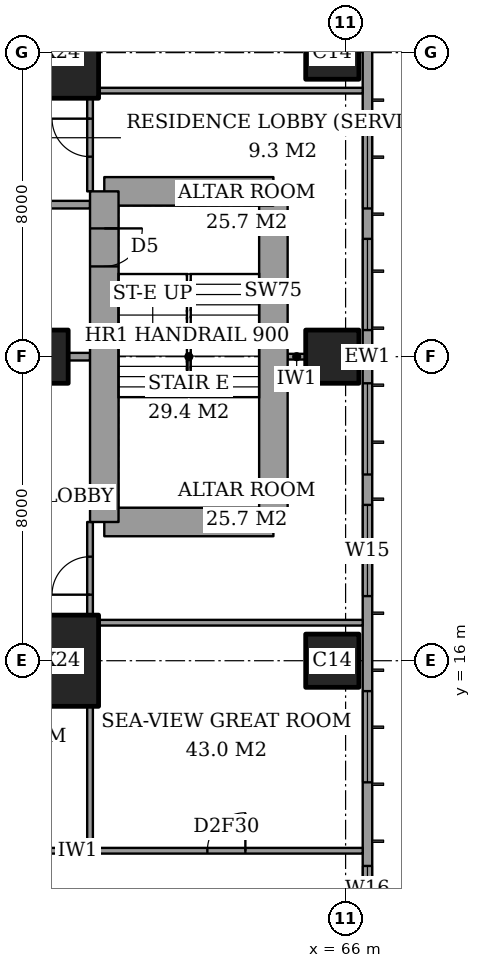
"""IFC4 building model, lengths in metres.
Left out: names, types, materials, properties, quantities, classifications, styles, units other than length and angle.
Written with IfcOpenShell. Run it as: python <this file> out.ifc"""

import sys

from ifc_helpers import new_model, si_unit, direction, frame, frame_2d, origin, origin_2d, place, context, subcontext, project, spatial, rectangle, extrude, element, fill, save


model = new_model("IFC4")
c1 = context("Model", 3, precision=1e-05, world=origin(), true_north=direction((0.0, 1.0)))
c2 = subcontext(c1, "Body", "Model", "MODEL_VIEW")
j1 = project(units=[si_unit("LENGTHUNIT", "METRE"), si_unit("PLANEANGLEUNIT", "RADIAN")], contexts=[c1])
p1 = place(None, origin())
s1 = spatial("IfcSite", under=j1, at=p1, CompositionType="ELEMENT")
p2 = place(p1, origin())
s2 = spatial("IfcBuilding", under=s1, at=p2, CompositionType="ELEMENT")
p3 = place(p2, frame((0.0, 0.0, 282.6)))
s3 = spatial("IfcBuildingStorey", under=s2, at=p3, CompositionType="ELEMENT", Elevation=282.6)
p4 = place(p3, frame((58.0, 16.0, 0.0), z_axis=(0.0, 0.0, 1.0), x_axis=(1.0, 0.0, 0.0)))
e1 = element("IfcColumn", 1, at=p4, inside=s3, PredefinedType="COLUMN", context=c2, shape_type="SweptSolid", body=[
    extrude(rectangle(XDim=3.0, YDim=2.4, at=origin_2d()), origin(), (0.0, 0.0, 1.0), 4.5),
])
p5 = place(p3, frame((58.0, 24.0, 0.0), z_axis=(0.0, 0.0, 1.0), x_axis=(1.0, 0.0, 0.0)))
e2 = element("IfcColumn", 2, at=p5, inside=s3, PredefinedType="COLUMN", context=c2, shape_type="SweptSolid", body=[
    extrude(rectangle(XDim=1.4, YDim=1.4, at=origin_2d()), origin(), (0.0, 0.0, 1.0), 4.5),
])
p6 = place(p3, frame((58.0, 32.0, 0.0), z_axis=(0.0, 0.0, 1.0), x_axis=(1.0, 0.0, 0.0)))
e3 = element("IfcColumn", 3, at=p6, inside=s3, PredefinedType="COLUMN", context=c2, shape_type="SweptSolid", body=[
    extrude(rectangle(XDim=3.0, YDim=2.4, at=origin_2d()), origin(), (0.0, 0.0, 1.0), 4.5),
])
for number, where, z_axis, x_axis in (
    (4, (65.65, 16.0, 0.0), (0.0, 0.0, 1.0), (1.0, 0.0, 0.0)),
    (5, (65.65, 24.0, 0.0), (0.0, 0.0, 1.0), (1.0, 0.0, 0.0)),
    (6, (65.65, 32.0, 0.0), (0.0, 0.0, 1.0), (1.0, 0.0, 0.0)),
):
    element("IfcColumn", number, at=place(p3, frame(where, z_axis=z_axis, x_axis=x_axis)), inside=s3, PredefinedType="COLUMN", context=c2, shape_type="SweptSolid", body=[
        extrude(rectangle(XDim=1.4, YDim=1.4, at=origin_2d()), origin(), (0.0, 0.0, 1.0), 4.5),
    ])
p7 = place(p3, frame((59.65, 19.65, 0.0), z_axis=(0.0, 0.0, 1.0), x_axis=(1.0, 0.0, 0.0)))
e7 = element("IfcWall", 7, at=p7, inside=s3, PredefinedType="SHEAR", context=c2, shape_type="SweptSolid", body=[
    extrude(rectangle(XDim=4.45, YDim=0.75, at=frame_2d((2.225, 0.0))), origin(), (0.0, 0.0, 1.0), 4.5),
])
p8 = place(p3, frame((64.1, 19.65, 0.0), z_axis=(0.0, 0.0, 1.0), x_axis=(0.0, 1.0, 0.0)))
e8 = element("IfcWall", 8, at=p8, inside=s3, PredefinedType="SHEAR", context=c2, shape_type="SweptSolid", body=[
    extrude(rectangle(XDim=8.7, YDim=0.75, at=frame_2d((4.35, 0.0))), origin(), (0.0, 0.0, 1.0), 4.5),
])
p9 = place(p3, frame((64.1, 28.35, 0.0), z_axis=(0.0, 0.0, 1.0), x_axis=(-1.0, 0.0, 0.0)))
e9 = element("IfcWall", 9, at=p9, inside=s3, PredefinedType="SHEAR", context=c2, shape_type="SweptSolid", body=[
    extrude(rectangle(XDim=4.45, YDim=0.75, at=frame_2d((2.225, 0.0))), origin(), (0.0, 0.0, 1.0), 4.5),
])
p10 = place(p3, frame((59.65, 28.35, 0.0), z_axis=(0.0, 0.0, 1.0), x_axis=(0.0, -1.0, 0.0)))
e10 = element("IfcWall", 10, at=p10, inside=s3, PredefinedType="SHEAR", context=c2, shape_type="SweptSolid", body=[
    extrude(rectangle(XDim=8.7, YDim=0.75, at=frame_2d((4.35, 0.0))), origin(), (0.0, 0.0, 1.0), 4.5),
])
p11 = place(p10, frame((0.975, 0.0, 0.0)))
e11 = element("IfcOpeningElement", 11, at=p11, cuts=e10, PredefinedType="OPENING", context=c2, shape_type="SweptSolid", body=[
    extrude(rectangle(XDim=1.0, YDim=2.1, at=frame_2d((0.5, 1.05))), frame((0.0, 0.385, 0.0), z_axis=(0.0, -1.0, 0.0), x_axis=(1.0, 0.0, 0.0)), (0.0, 0.0, 1.0), 0.77),
])
p12 = place(p3, frame((66.575, 3.175, 0.0), z_axis=(0.0, 0.0, 1.0), x_axis=(0.0, 1.0, 0.0)))
e12 = element("IfcWall", 12, at=p12, inside=s3, PredefinedType="SOLIDWALL", context=c2, shape_type="SweptSolid", body=[
    extrude(rectangle(XDim=41.65, YDim=0.25, at=frame_2d((20.825, 0.0))), origin(), (0.0, 0.0, 1.0), 4.5),
])
p13 = place(p12, frame((1.775, 0.0, 0.6)))
e13 = element("IfcOpeningElement", 13, at=p13, cuts=e12, PredefinedType="OPENING", context=c2, shape_type="SweptSolid", body=[
    extrude(rectangle(XDim=2.4, YDim=2.8, at=frame_2d((1.2, 1.4))), frame((0.0, 0.135, 0.0), z_axis=(0.0, -1.0, 0.0), x_axis=(1.0, 0.0, 0.0)), (0.0, 0.0, 1.0), 0.27),
])
p14 = place(p12, frame((6.225, 0.0, 0.6)))
e14 = element("IfcOpeningElement", 14, at=p14, cuts=e12, PredefinedType="OPENING", context=c2, shape_type="SweptSolid", body=[
    extrude(rectangle(XDim=1.2, YDim=2.8, at=frame_2d((0.6, 1.4))), frame((0.0, 0.135, 0.0), z_axis=(0.0, -1.0, 0.0), x_axis=(1.0, 0.0, 0.0)), (0.0, 0.0, 1.0), 0.27),
])
p15 = place(p12, frame((9.625, 0.0, 0.6)))
e15 = element("IfcOpeningElement", 15, at=p15, cuts=e12, PredefinedType="OPENING", context=c2, shape_type="SweptSolid", body=[
    extrude(rectangle(XDim=2.4, YDim=2.8, at=frame_2d((1.2, 1.4))), frame((0.0, 0.135, 0.0), z_axis=(0.0, -1.0, 0.0), x_axis=(1.0, 0.0, 0.0)), (0.0, 0.0, 1.0), 0.27),
])
p16 = place(p12, frame((14.525, 0.0, 0.6)))
e16 = element("IfcOpeningElement", 16, at=p16, cuts=e12, PredefinedType="OPENING", context=c2, shape_type="SweptSolid", body=[
    extrude(rectangle(XDim=2.4, YDim=2.8, at=frame_2d((1.2, 1.4))), frame((0.0, 0.135, 0.0), z_axis=(0.0, -1.0, 0.0), x_axis=(1.0, 0.0, 0.0)), (0.0, 0.0, 1.0), 0.27),
])
p17 = place(p12, frame((17.725, 0.0, 0.6)))
e17 = element("IfcOpeningElement", 17, at=p17, cuts=e12, PredefinedType="OPENING", context=c2, shape_type="SweptSolid", body=[
    extrude(rectangle(XDim=2.4, YDim=2.8, at=frame_2d((1.2, 1.4))), frame((0.0, 0.135, 0.0), z_axis=(0.0, -1.0, 0.0), x_axis=(1.0, 0.0, 0.0)), (0.0, 0.0, 1.0), 0.27),
])
p18 = place(p12, frame((21.525, 0.0, 0.6)))
e18 = element("IfcOpeningElement", 18, at=p18, cuts=e12, PredefinedType="OPENING", context=c2, shape_type="SweptSolid", body=[
    extrude(rectangle(XDim=2.4, YDim=2.8, at=frame_2d((1.2, 1.4))), frame((0.0, 0.135, 0.0), z_axis=(0.0, -1.0, 0.0), x_axis=(1.0, 0.0, 0.0)), (0.0, 0.0, 1.0), 0.27),
])
p19 = place(p12, frame((24.725, 0.0, 0.6)))
e19 = element("IfcOpeningElement", 19, at=p19, cuts=e12, PredefinedType="OPENING", context=c2, shape_type="SweptSolid", body=[
    extrude(rectangle(XDim=2.4, YDim=2.8, at=frame_2d((1.2, 1.4))), frame((0.0, 0.135, 0.0), z_axis=(0.0, -1.0, 0.0), x_axis=(1.0, 0.0, 0.0)), (0.0, 0.0, 1.0), 0.27),
])
p20 = place(p12, frame((29.725, 0.0, 0.6)))
e20 = element("IfcOpeningElement", 20, at=p20, cuts=e12, PredefinedType="OPENING", context=c2, shape_type="SweptSolid", body=[
    extrude(rectangle(XDim=2.4, YDim=2.8, at=frame_2d((1.2, 1.4))), frame((0.0, 0.135, 0.0), z_axis=(0.0, -1.0, 0.0), x_axis=(1.0, 0.0, 0.0)), (0.0, 0.0, 1.0), 0.27),
])
p21 = place(p12, frame((34.325, 0.0, 0.6)))
e21 = element("IfcOpeningElement", 21, at=p21, cuts=e12, PredefinedType="OPENING", context=c2, shape_type="SweptSolid", body=[
    extrude(rectangle(XDim=1.2, YDim=2.8, at=frame_2d((0.6, 1.4))), frame((0.0, 0.135, 0.0), z_axis=(0.0, -1.0, 0.0), x_axis=(1.0, 0.0, 0.0)), (0.0, 0.0, 1.0), 0.27),
])
p22 = place(p12, frame((37.475, 0.0, 0.6)))
e22 = element("IfcOpeningElement", 22, at=p22, cuts=e12, PredefinedType="OPENING", context=c2, shape_type="SweptSolid", body=[
    extrude(rectangle(XDim=2.4, YDim=2.8, at=frame_2d((1.2, 1.4))), frame((0.0, 0.135, 0.0), z_axis=(0.0, -1.0, 0.0), x_axis=(1.0, 0.0, 0.0)), (0.0, 0.0, 1.0), 0.27),
])
p23 = place(p3, frame((41.439, 11.0, 0.0), z_axis=(0.0, 0.0, 1.0), x_axis=(1.0, 0.0, 0.0)))
e23 = element("IfcWall", 23, at=p23, inside=s3, PredefinedType="PARTITIONING", context=c2, shape_type="SweptSolid", body=[
    extrude(rectangle(XDim=25.011, YDim=0.15, at=frame_2d((12.505, 0.0))), origin(), (0.0, 0.0, 1.0), 4.25),
])
p24 = place(p23, frame((11.961, 0.0, 0.0)))
e24 = element("IfcOpeningElement", 24, at=p24, cuts=e23, PredefinedType="OPENING", context=c2, shape_type="SweptSolid", body=[
    extrude(rectangle(XDim=1.0, YDim=2.1, at=frame_2d((0.5, 1.05))), frame((0.0, 0.085, 0.0), z_axis=(0.0, -1.0, 0.0), x_axis=(1.0, 0.0, 0.0)), (0.0, 0.0, 1.0), 0.17),
])
p25 = place(p23, frame((20.924, 0.0, 0.0)))
e25 = element("IfcOpeningElement", 25, at=p25, cuts=e23, PredefinedType="OPENING", context=c2, shape_type="SweptSolid", body=[
    extrude(rectangle(XDim=1.0, YDim=2.1, at=frame_2d((0.5, 1.05))), frame((0.0, 0.085, 0.0), z_axis=(0.0, -1.0, 0.0), x_axis=(1.0, 0.0, 0.0)), (0.0, 0.0, 1.0), 0.17),
])
p26 = place(p23, frame((15.249, 0.0, 0.0)))
e26 = element("IfcOpeningElement", 26, at=p26, cuts=e23, PredefinedType="OPENING", context=c2, shape_type="SweptSolid", body=[
    extrude(rectangle(XDim=0.9, YDim=2.1, at=frame_2d((0.45, 1.05))), frame((0.0, 0.085, 0.0), z_axis=(0.0, -1.0, 0.0), x_axis=(1.0, 0.0, 0.0)), (0.0, 0.0, 1.0), 0.17),
])
p27 = place(p23, frame((9.561, 0.0, 0.0)))
e27 = element("IfcOpeningElement", 27, at=p27, cuts=e23, PredefinedType="OPENING", context=c2, shape_type="SweptSolid", body=[
    extrude(rectangle(XDim=1.0, YDim=2.1, at=frame_2d((0.5, 1.05))), frame((0.0, 0.085, 0.0), z_axis=(0.0, -1.0, 0.0), x_axis=(1.0, 0.0, 0.0)), (0.0, 0.0, 1.0), 0.17),
])
p28 = place(p23, frame((7.211, 0.0, 0.0)))
e28 = element("IfcOpeningElement", 28, at=p28, cuts=e23, PredefinedType="OPENING", context=c2, shape_type="SweptSolid", body=[
    extrude(rectangle(XDim=0.9, YDim=2.1, at=frame_2d((0.45, 1.05))), frame((0.0, 0.085, 0.0), z_axis=(0.0, -1.0, 0.0), x_axis=(1.0, 0.0, 0.0)), (0.0, 0.0, 1.0), 0.17),
])
p29 = place(p23, frame((2.836, 0.0, 0.0)))
e29 = element("IfcOpeningElement", 29, at=p29, cuts=e23, PredefinedType="OPENING", context=c2, shape_type="SweptSolid", body=[
    extrude(rectangle(XDim=1.0, YDim=2.1, at=frame_2d((0.5, 1.05))), frame((0.0, 0.085, 0.0), z_axis=(0.0, -1.0, 0.0), x_axis=(1.0, 0.0, 0.0)), (0.0, 0.0, 1.0), 0.17),
])
p30 = place(p3, frame((59.5, 17.0, 0.0), z_axis=(0.0, 0.0, 1.0), x_axis=(1.0, 0.0, 0.0)))
e30 = element("IfcWall", 30, at=p30, inside=s3, PredefinedType="PARTITIONING", context=c2, shape_type="SweptSolid", body=[
    extrude(rectangle(XDim=6.95, YDim=0.15, at=frame_2d((3.475, 0.0))), origin(), (0.0, 0.0, 1.0), 4.25),
])
p31 = place(p3, frame((58.7, 24.0, 0.0), z_axis=(0.0, 0.0, 1.0), x_axis=(1.0, 0.0, 0.0)))
e31 = element("IfcWall", 31, at=p31, inside=s3, PredefinedType="PARTITIONING", context=c2, shape_type="SweptSolid", body=[
    extrude(rectangle(XDim=0.575, YDim=0.2, at=frame_2d((0.288, 0.0))), origin(), (0.0, 0.0, 1.0), 4.25),
])
p32 = place(p3, frame((64.475, 24.0, 0.0), z_axis=(0.0, 0.0, 1.0), x_axis=(1.0, 0.0, 0.0)))
e32 = element("IfcWall", 32, at=p32, inside=s3, PredefinedType="PARTITIONING", context=c2, shape_type="SweptSolid", body=[
    extrude(rectangle(XDim=0.475, YDim=0.15, at=frame_2d((0.237, 0.0))), origin(), (0.0, 0.0, 1.0), 4.25),
])
p33 = place(p3, frame((42.0, 28.0, 0.0), z_axis=(0.0, 0.0, 1.0), x_axis=(1.0, 0.0, 0.0)))
e33 = element("IfcWall", 33, at=p33, inside=s3, PredefinedType="PARTITIONING", context=c2, shape_type="SweptSolid", body=[
    extrude(rectangle(XDim=17.275, YDim=0.2, at=frame_2d((8.637, 0.0))), origin(), (0.0, 0.0, 1.0), 4.25),
])
p34 = place(p33, frame((9.4, 0.0, 0.0)))
e34 = element("IfcOpeningElement", 34, at=p34, cuts=e33, PredefinedType="OPENING", context=c2, shape_type="SweptSolid", body=[
    extrude(rectangle(XDim=1.2, YDim=2.4, at=frame_2d((0.6, 1.2))), frame((0.0, 0.11, 0.0), z_axis=(0.0, -1.0, 0.0), x_axis=(1.0, 0.0, 0.0)), (0.0, 0.0, 1.0), 0.22),
])
p35 = place(p3, frame((59.5, 31.0, 0.0), z_axis=(0.0, 0.0, 1.0), x_axis=(1.0, 0.0, 0.0)))
e35 = element("IfcWall", 35, at=p35, inside=s3, PredefinedType="PARTITIONING", context=c2, shape_type="SweptSolid", body=[
    extrude(rectangle(XDim=6.95, YDim=0.15, at=frame_2d((3.475, 0.0))), origin(), (0.0, 0.0, 1.0), 4.25),
])
p36 = place(p3, frame((59.275, 11.0, 0.0), z_axis=(0.0, 0.0, 1.0), x_axis=(0.0, 1.0, 0.0)))
e36 = element("IfcWall", 36, at=p36, inside=s3, PredefinedType="PARTITIONING", context=c2, shape_type="SweptSolid", body=[
    extrude(rectangle(XDim=3.8, YDim=0.15, at=frame_2d((1.9, 0.0))), origin(), (0.0, 0.0, 1.0), 4.25),
])
p37 = place(p3, frame((59.275, 17.2, 0.0), z_axis=(0.0, 0.0, 1.0), x_axis=(0.0, 1.0, 0.0)))
e37 = element("IfcWall", 37, at=p37, inside=s3, PredefinedType="PARTITIONING", context=c2, shape_type="SweptSolid", body=[
    extrude(rectangle(XDim=2.45, YDim=0.15, at=frame_2d((1.225, 0.0))), origin(), (0.0, 0.0, 1.0), 4.25),
])
p38 = place(p37, frame((0.538, 0.0, 0.0)))
e38 = element("IfcOpeningElement", 38, at=p38, cuts=e37, PredefinedType="OPENING", context=c2, shape_type="SweptSolid", body=[
    extrude(rectangle(XDim=1.0, YDim=2.1, at=frame_2d((0.5, 1.05))), frame((0.0, 0.085, 0.0), z_axis=(0.0, -1.0, 0.0), x_axis=(1.0, 0.0, 0.0)), (0.0, 0.0, 1.0), 0.17),
])
p39 = place(p3, frame((59.275, 28.35, 0.0), z_axis=(0.0, 0.0, 1.0), x_axis=(0.0, 1.0, 0.0)))
e39 = element("IfcWall", 39, at=p39, inside=s3, PredefinedType="PARTITIONING", context=c2, shape_type="SweptSolid", body=[
    extrude(rectangle(XDim=2.45, YDim=0.15, at=frame_2d((1.225, 0.0))), origin(), (0.0, 0.0, 1.0), 4.25),
])
p40 = place(p39, frame((0.913, 0.0, 0.0)))
e40 = element("IfcOpeningElement", 40, at=p40, cuts=e39, PredefinedType="OPENING", context=c2, shape_type="SweptSolid", body=[
    extrude(rectangle(XDim=1.0, YDim=2.1, at=frame_2d((0.5, 1.05))), frame((0.0, 0.085, 0.0), z_axis=(0.0, -1.0, 0.0), x_axis=(1.0, 0.0, 0.0)), (0.0, 0.0, 1.0), 0.17),
])
p41 = place(p14, origin())
e41 = element("IfcWindow", 41, at=p41, inside=s3, PartitioningType="SINGLE_PANEL", PredefinedType="WINDOW", context=c2, shape_type="SweptSolid", body=[
    extrude(rectangle(XDim=1.2, YDim=2.8, at=frame_2d((0.6, 1.4))), frame((0.0, 0.03, 0.0), z_axis=(0.0, -1.0, 0.0), x_axis=(1.0, 0.0, 0.0)), (0.0, 0.0, 1.0), 0.06),
])
fill(e14, e41)
p42 = place(p15, origin())
e42 = element("IfcWindow", 42, at=p42, inside=s3, PartitioningType="SINGLE_PANEL", PredefinedType="WINDOW", context=c2, shape_type="SweptSolid", body=[
    extrude(rectangle(XDim=2.4, YDim=2.8, at=frame_2d((1.2, 1.4))), frame((0.0, 0.03, 0.0), z_axis=(0.0, -1.0, 0.0), x_axis=(1.0, 0.0, 0.0)), (0.0, 0.0, 1.0), 0.06),
])
fill(e15, e42)
p43 = place(p16, origin())
e43 = element("IfcWindow", 43, at=p43, inside=s3, PartitioningType="SINGLE_PANEL", PredefinedType="WINDOW", context=c2, shape_type="SweptSolid", body=[
    extrude(rectangle(XDim=2.4, YDim=2.8, at=frame_2d((1.2, 1.4))), frame((0.0, 0.03, 0.0), z_axis=(0.0, -1.0, 0.0), x_axis=(1.0, 0.0, 0.0)), (0.0, 0.0, 1.0), 0.06),
])
fill(e16, e43)
p44 = place(p17, origin())
e44 = element("IfcWindow", 44, at=p44, inside=s3, PartitioningType="SINGLE_PANEL", PredefinedType="WINDOW", context=c2, shape_type="SweptSolid", body=[
    extrude(rectangle(XDim=2.4, YDim=2.8, at=frame_2d((1.2, 1.4))), frame((0.0, 0.03, 0.0), z_axis=(0.0, -1.0, 0.0), x_axis=(1.0, 0.0, 0.0)), (0.0, 0.0, 1.0), 0.06),
])
fill(e17, e44)
p45 = place(p18, origin())
e45 = element("IfcWindow", 45, at=p45, inside=s3, PartitioningType="SINGLE_PANEL", PredefinedType="WINDOW", context=c2, shape_type="SweptSolid", body=[
    extrude(rectangle(XDim=2.4, YDim=2.8, at=frame_2d((1.2, 1.4))), frame((0.0, 0.03, 0.0), z_axis=(0.0, -1.0, 0.0), x_axis=(1.0, 0.0, 0.0)), (0.0, 0.0, 1.0), 0.06),
])
fill(e18, e45)
p46 = place(p19, origin())
e46 = element("IfcWindow", 46, at=p46, inside=s3, PartitioningType="SINGLE_PANEL", PredefinedType="WINDOW", context=c2, shape_type="SweptSolid", body=[
    extrude(rectangle(XDim=2.4, YDim=2.8, at=frame_2d((1.2, 1.4))), frame((0.0, 0.03, 0.0), z_axis=(0.0, -1.0, 0.0), x_axis=(1.0, 0.0, 0.0)), (0.0, 0.0, 1.0), 0.06),
])
fill(e19, e46)
p47 = place(p25, origin())
e47 = element("IfcDoor", 47, at=p47, inside=s3, OperationType="SINGLE_SWING_LEFT", PredefinedType="DOOR", context=c2, shape_type="SweptSolid", body=[
    extrude(rectangle(XDim=1.0, YDim=2.1, at=frame_2d((0.5, 1.05))), frame((0.0, 0.025, 0.0), z_axis=(0.0, -1.0, 0.0), x_axis=(1.0, 0.0, 0.0)), (0.0, 0.0, 1.0), 0.05),
])
fill(e25, e47)
p48 = place(p38, origin())
e48 = element("IfcDoor", 48, at=p48, inside=s3, OperationType="SINGLE_SWING_RIGHT", PredefinedType="DOOR", context=c2, shape_type="SweptSolid", body=[
    extrude(rectangle(XDim=1.0, YDim=2.1, at=frame_2d((0.5, 1.05))), frame((0.0, 0.025, 0.0), z_axis=(0.0, -1.0, 0.0), x_axis=(1.0, 0.0, 0.0)), (0.0, 0.0, 1.0), 0.05),
])
fill(e38, e48)
p49 = place(p40, origin())
e49 = element("IfcDoor", 49, at=p49, inside=s3, OperationType="SINGLE_SWING_LEFT", PredefinedType="DOOR", context=c2, shape_type="SweptSolid", body=[
    extrude(rectangle(XDim=1.0, YDim=2.1, at=frame_2d((0.5, 1.05))), frame((0.0, 0.025, 0.0), z_axis=(0.0, -1.0, 0.0), x_axis=(1.0, 0.0, 0.0)), (0.0, 0.0, 1.0), 0.05),
])
fill(e40, e49)
p50 = place(p11, origin())
e50 = element("IfcDoor", 50, at=p50, inside=s3, OperationType="SINGLE_SWING_RIGHT", PredefinedType="DOOR", context=c2, shape_type="SweptSolid", body=[
    extrude(rectangle(XDim=1.0, YDim=2.1, at=frame_2d((0.5, 1.05))), frame((0.0, 0.025, 0.0), z_axis=(0.0, -1.0, 0.0), x_axis=(1.0, 0.0, 0.0)), (0.0, 0.0, 1.0), 0.05),
])
fill(e11, e50)
save(model, sys.argv[1])
